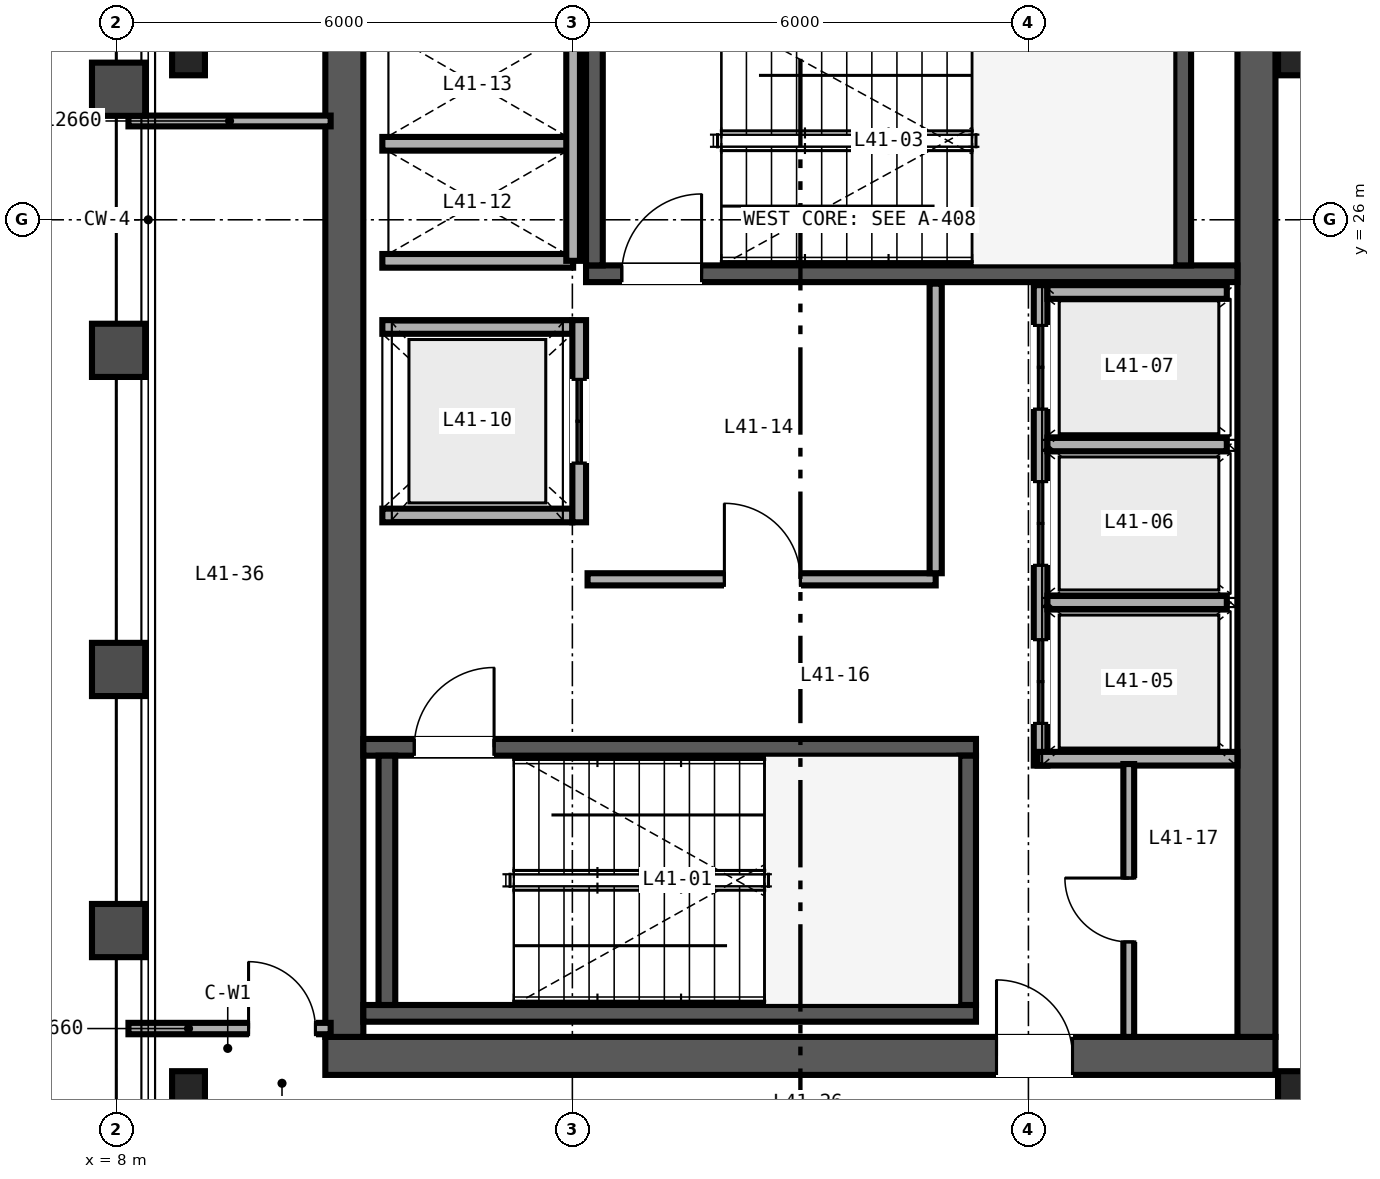
"""IFC4 building model, lengths in metres.
Left out: names, types, materials, properties, quantities, classifications, styles, units other than length and angle.
Written with IfcOpenShell. Run it as: python <this file> out.ifc"""

import sys

from ifc_helpers import new_model, si_unit, direction, frame, frame_2d, origin, origin_2d, place, context, subcontext, project, spatial, rectangle, i_section, extrude, source, transform, mapped, element, fill, save


model = new_model("IFC4")
c1 = context("Model", 3, precision=1e-05, world=origin(), true_north=direction((0.0, 1.0)))
c2 = subcontext(c1, "Body", "Model", "MODEL_VIEW")
j1 = project(units=[si_unit("LENGTHUNIT", "METRE"), si_unit("PLANEANGLEUNIT", "RADIAN")], contexts=[c1])
p1 = place(None, origin())
s1 = spatial("IfcSite", under=j1, at=p1, CompositionType="ELEMENT")
p2 = place(p1, origin())
s2 = spatial("IfcBuilding", under=s1, at=p2, CompositionType="ELEMENT")
p3 = place(p2, frame((0.0, 0.0, 166.8)))
s3 = spatial("IfcBuildingStorey", under=s2, at=p3, CompositionType="ELEMENT", Elevation=166.8)
p4 = place(p3, frame((10.75, 15.0, 0.0), z_axis=(0.0, 0.0, 1.0), x_axis=(1.0, 0.0, 0.0)))
e1 = element("IfcWall", 1, at=p4, inside=s3, PredefinedType="SHEAR", context=c2, shape_type="SweptSolid", body=[
    extrude(rectangle(XDim=12.5, YDim=0.5, at=frame_2d((6.25, 0.0))), origin(), (0.0, 0.0, 1.0), 3.37),
])
p5 = place(p4, frame((8.83, 0.0, 0.0)))
e2 = element("IfcOpeningElement", 2, at=p5, cuts=e1, PredefinedType="OPENING", context=c2, shape_type="SweptSolid", body=[
    extrude(rectangle(XDim=1.0, YDim=2.15, at=frame_2d((0.5, 1.075))), frame((0.0, 0.26, 0.0), z_axis=(0.0, -1.0, 0.0), x_axis=(1.0, 0.0, 0.0)), (0.0, 0.0, 1.0), 0.52),
])
for number, where, z_axis, x_axis in (
    (3, (11.0, 15.25, 0.0), (0.0, 0.0, 1.0), (0.0, 1.0, 0.0)),
    (4, (23.0, 15.25, 0.0), (0.0, 0.0, 1.0), (0.0, 1.0, 0.0)),
):
    element("IfcWall", number, at=place(p3, frame(where, z_axis=z_axis, x_axis=x_axis)), inside=s3, PredefinedType="SHEAR", context=c2, shape_type="SweptSolid", body=[
        extrude(rectangle(XDim=21.5, YDim=0.5, at=frame_2d((10.75, 0.0))), origin(), (0.0, 0.0, 1.0), 3.37),
    ])
p6 = place(p3, frame((11.25, 15.56, 0.0), z_axis=(0.0, 0.0, 1.0), x_axis=(1.0, 0.0, 0.0)))
e5 = element("IfcWall", 5, at=p6, inside=s3, PredefinedType="SHEAR", context=c2, shape_type="SweptSolid", body=[
    extrude(rectangle(XDim=8.06, YDim=0.22, at=frame_2d((4.03, 0.0))), origin(), (0.0, 0.0, 1.0), 3.4),
])
p7 = place(p3, frame((11.25, 19.06, 0.0), z_axis=(0.0, 0.0, 1.0), x_axis=(1.0, 0.0, 0.0)))
e6 = element("IfcWall", 6, at=p7, inside=s3, PredefinedType="SHEAR", context=c2, shape_type="SweptSolid", body=[
    extrude(rectangle(XDim=8.06, YDim=0.22, at=frame_2d((4.03, 0.0))), origin(), (0.0, 0.0, 1.0), 3.4),
])
p8 = place(p7, frame((0.67, 0.0, 0.0)))
e7 = element("IfcOpeningElement", 7, at=p8, cuts=e6, PredefinedType="OPENING", context=c2, shape_type="SweptSolid", body=[
    extrude(rectangle(XDim=1.05, YDim=2.15, at=frame_2d((0.525, 1.075))), frame((0.0, 0.12, 0.0), z_axis=(0.0, -1.0, 0.0), x_axis=(1.0, 0.0, 0.0)), (0.0, 0.0, 1.0), 0.24),
])
for number, where, z_axis, x_axis in (
    (8, (11.56, 15.67, 0.0), (0.0, 0.0, 1.0), (0.0, 1.0, 0.0)),
    (9, (19.2, 15.67, 0.0), (0.0, 0.0, 1.0), (0.0, 1.0, 0.0)),
):
    element("IfcWall", number, at=place(p3, frame(where, z_axis=z_axis, x_axis=x_axis)), inside=s3, PredefinedType="SHEAR", context=c2, shape_type="SweptSolid", body=[
        extrude(rectangle(XDim=3.28, YDim=0.22, at=frame_2d((1.64, 0.0))), origin(), (0.0, 0.0, 1.0), 3.4),
    ])
p9 = place(p3, frame((14.18, 25.29, 0.0), z_axis=(0.0, 0.0, 1.0), x_axis=(1.0, 0.0, 0.0)))
e10 = element("IfcWall", 10, at=p9, inside=s3, PredefinedType="SHEAR", context=c2, shape_type="SweptSolid", body=[
    extrude(rectangle(XDim=8.57, YDim=0.22, at=frame_2d((4.285, 0.0))), origin(), (0.0, 0.0, 1.0), 3.4),
])
p10 = place(p9, frame((0.47, 0.0, 0.0)))
e11 = element("IfcOpeningElement", 11, at=p10, cuts=e10, PredefinedType="OPENING", context=c2, shape_type="SweptSolid", body=[
    extrude(rectangle(XDim=1.05, YDim=2.15, at=frame_2d((0.525, 1.075))), frame((0.0, 0.12, 0.0), z_axis=(0.0, -1.0, 0.0), x_axis=(1.0, 0.0, 0.0)), (0.0, 0.0, 1.0), 0.24),
])
for number, where, z_axis, x_axis in (
    (12, (14.29, 25.4, 0.0), (0.0, 0.0, 1.0), (0.0, 1.0, 0.0)),
    (13, (22.03, 25.4, 0.0), (0.0, 0.0, 1.0), (0.0, 1.0, 0.0)),
):
    element("IfcWall", number, at=place(p3, frame(where, z_axis=z_axis, x_axis=x_axis)), inside=s3, PredefinedType="SHEAR", context=c2, shape_type="SweptSolid", body=[
        extrude(rectangle(XDim=3.28, YDim=0.22, at=frame_2d((1.64, 0.0))), origin(), (0.0, 0.0, 1.0), 3.4),
    ])
m1 = source(origin(), c2, "Body", "SweptSolid", [
    extrude(i_section(OverallWidth=0.432, OverallDepth=0.498, WebThickness=0.056, FlangeThickness=0.089, FilletRadius=0.025, at=origin_2d()), origin(), (0.0, 0.0, 1.0), 3.37),
])
for number, where, z_axis, x_axis in (
    (14, (8.95, 14.55, 0.0), (0.0, 0.0, 1.0), (1.0, 0.0, 0.0)),
    (15, (23.5, 14.55, 0.0), (0.0, 0.0, 1.0), (1.0, 0.0, 0.0)),
    (16, (8.95, 28.15, 0.0), (0.0, 0.0, 1.0), (1.0, 0.0, 0.0)),
    (17, (23.5, 28.15, 0.0), (0.0, 0.0, 1.0), (1.0, 0.0, 0.0)),
):
    element("IfcColumn", number, at=place(p3, frame(where, z_axis=z_axis, x_axis=x_axis)), inside=s3, PredefinedType="COLUMN", context=c2, shape_type="MappedRepresentation", body=[
        mapped(m1, transform((0.0, 0.0, 0.0), scale=1.0)),
    ])
p11 = place(p3, frame((20.16, 18.82, 0.0), z_axis=(0.0, 0.0, 1.0), x_axis=(0.0, 1.0, 0.0)))
e18 = element("IfcWall", 18, at=p11, inside=s3, PredefinedType="SOLIDWALL", context=c2, shape_type="SweptSolid", body=[
    extrude(rectangle(XDim=6.32, YDim=0.18, at=frame_2d((3.16, 0.0))), origin(), (0.0, 0.0, 1.0), 2.47),
])
p12 = place(p11, frame((0.555, 0.0, 0.0)))
e19 = element("IfcOpeningElement", 19, at=p12, cuts=e18, PredefinedType="OPENING", context=c2, shape_type="SweptSolid", body=[
    extrude(rectangle(XDim=1.1, YDim=2.2, at=frame_2d((0.55, 1.1))), frame((0.0, 0.1, 0.0), z_axis=(0.0, -1.0, 0.0), x_axis=(1.0, 0.0, 0.0)), (0.0, 0.0, 1.0), 0.2),
])
p13 = place(p11, frame((2.635, 0.0, 0.0)))
e20 = element("IfcOpeningElement", 20, at=p13, cuts=e18, PredefinedType="OPENING", context=c2, shape_type="SweptSolid", body=[
    extrude(rectangle(XDim=1.1, YDim=2.2, at=frame_2d((0.55, 1.1))), frame((0.0, 0.1, 0.0), z_axis=(0.0, -1.0, 0.0), x_axis=(1.0, 0.0, 0.0)), (0.0, 0.0, 1.0), 0.2),
])
p14 = place(p11, frame((4.69, 0.0, 0.0)))
e21 = element("IfcOpeningElement", 21, at=p14, cuts=e18, PredefinedType="OPENING", context=c2, shape_type="SweptSolid", body=[
    extrude(rectangle(XDim=1.1, YDim=2.2, at=frame_2d((0.55, 1.1))), frame((0.0, 0.1, 0.0), z_axis=(0.0, -1.0, 0.0), x_axis=(1.0, 0.0, 0.0)), (0.0, 0.0, 1.0), 0.2),
])
p15 = place(p3, frame((20.12, 18.91, 0.0), z_axis=(0.0, 0.0, 1.0), x_axis=(1.0, 0.0, 0.0)))
e22 = element("IfcWall", 22, at=p15, inside=s3, PredefinedType="SOLIDWALL", context=c2, shape_type="SweptSolid", body=[
    extrude(rectangle(XDim=2.63, YDim=0.18, at=frame_2d((1.315, 0.0))), origin(), (0.0, 0.0, 1.0), 3.37),
])
p16 = place(p3, frame((20.25, 25.05, 0.0), z_axis=(0.0, 0.0, 1.0), x_axis=(1.0, 0.0, 0.0)))
e23 = element("IfcWall", 23, at=p16, inside=s3, PredefinedType="SOLIDWALL", context=c2, shape_type="SweptSolid", body=[
    extrude(rectangle(XDim=2.36, YDim=0.18, at=frame_2d((1.18, 0.0))), origin(), (0.0, 0.0, 1.0), 3.37),
])
p17 = place(p3, frame((20.25, 20.965, 0.0), z_axis=(0.0, 0.0, 1.0), x_axis=(1.0, 0.0, 0.0)))
e24 = element("IfcWall", 24, at=p17, inside=s3, PredefinedType="SOLIDWALL", context=c2, shape_type="SweptSolid", body=[
    extrude(rectangle(XDim=2.36, YDim=0.18, at=frame_2d((1.18, 0.0))), origin(), (0.0, 0.0, 1.0), 2.47),
])
p18 = place(p3, frame((20.25, 23.045, 0.0), z_axis=(0.0, 0.0, 1.0), x_axis=(1.0, 0.0, 0.0)))
e25 = element("IfcWall", 25, at=p18, inside=s3, PredefinedType="SOLIDWALL", context=c2, shape_type="SweptSolid", body=[
    extrude(rectangle(XDim=2.36, YDim=0.18, at=frame_2d((1.18, 0.0))), origin(), (0.0, 0.0, 1.0), 3.37),
])
for number, where, z_axis, x_axis in (
    (26, (11.5, 22.11, 0.0), (0.0, 0.0, 1.0), (1.0, 0.0, 0.0)),
    (27, (11.5, 24.59, 0.0), (0.0, 0.0, 1.0), (1.0, 0.0, 0.0)),
):
    element("IfcWall", number, at=place(p3, frame(where, z_axis=z_axis, x_axis=x_axis)), inside=s3, PredefinedType="SOLIDWALL", context=c2, shape_type="SweptSolid", body=[
        extrude(rectangle(XDim=2.5, YDim=0.18, at=frame_2d((1.25, 0.0))), origin(), (0.0, 0.0, 1.0), 3.37),
    ])
p19 = place(p3, frame((14.09, 22.02, 0.0), z_axis=(0.0, 0.0, 1.0), x_axis=(0.0, 1.0, 0.0)))
e28 = element("IfcWall", 28, at=p19, inside=s3, PredefinedType="SOLIDWALL", context=c2, shape_type="SweptSolid", body=[
    extrude(rectangle(XDim=2.66, YDim=0.18, at=frame_2d((1.33, 0.0))), origin(), (0.0, 0.0, 1.0), 3.37),
])
p20 = place(p19, frame((0.78, 0.0, 0.0)))
e29 = element("IfcOpeningElement", 29, at=p20, cuts=e28, PredefinedType="OPENING", context=c2, shape_type="SweptSolid", body=[
    extrude(rectangle(XDim=1.1, YDim=2.2, at=frame_2d((0.55, 1.1))), frame((0.0, 0.1, 0.0), z_axis=(0.0, -1.0, 0.0), x_axis=(1.0, 0.0, 0.0)), (0.0, 0.0, 1.0), 0.2),
])
for number, where, z_axis, x_axis in (
    (30, (11.5, 25.46, 0.0), (0.0, 0.0, 1.0), (1.0, 0.0, 0.0)),
    (31, (11.5, 27.0, 0.0), (0.0, 0.0, 1.0), (1.0, 0.0, 0.0)),
):
    element("IfcWall", number, at=place(p3, frame(where, z_axis=z_axis, x_axis=x_axis)), inside=s3, PredefinedType="SOLIDWALL", context=c2, shape_type="SweptSolid", body=[
        extrude(rectangle(XDim=2.51, YDim=0.18, at=frame_2d((1.255, 0.0))), origin(), (0.0, 0.0, 1.0), 3.37),
    ])
p21 = place(p3, frame((14.01, 25.46, 0.0), z_axis=(0.0, 0.0, 1.0), x_axis=(0.0, 1.0, 0.0)))
e32 = element("IfcWall", 32, at=p21, inside=s3, PredefinedType="SOLIDWALL", context=c2, shape_type="SweptSolid", body=[
    extrude(rectangle(XDim=3.08, YDim=0.18, at=frame_2d((1.54, 0.0))), origin(), (0.0, 0.0, 1.0), 3.37),
])
p22 = place(p3, frame((14.2, 21.27, 0.0), z_axis=(0.0, 0.0, 1.0), x_axis=(1.0, 0.0, 0.0)))
e33 = element("IfcWall", 33, at=p22, inside=s3, PredefinedType="PARTITIONING", context=c2, shape_type="SweptSolid", body=[
    extrude(rectangle(XDim=4.58, YDim=0.16, at=frame_2d((2.29, 0.0))), origin(), (0.0, 0.0, 1.0), 3.37),
])
p23 = place(p22, frame((1.8, 0.0, 0.0)))
e34 = element("IfcOpeningElement", 34, at=p23, cuts=e33, PredefinedType="OPENING", context=c2, shape_type="SweptSolid", body=[
    extrude(rectangle(XDim=1.0, YDim=2.15, at=frame_2d((0.5, 1.075))), frame((0.0, 0.09, 0.0), z_axis=(0.0, -1.0, 0.0), x_axis=(1.0, 0.0, 0.0)), (0.0, 0.0, 1.0), 0.18),
])
p24 = place(p3, frame((18.78, 21.35, 0.0), z_axis=(0.0, 0.0, 1.0), x_axis=(0.0, 1.0, 0.0)))
e35 = element("IfcWall", 35, at=p24, inside=s3, PredefinedType="PARTITIONING", context=c2, shape_type="SweptSolid", body=[
    extrude(rectangle(XDim=3.81, YDim=0.16, at=frame_2d((1.905, 0.0))), origin(), (0.0, 0.0, 1.0), 3.37),
])
p25 = place(p3, frame((21.32, 15.25, 0.0), z_axis=(0.0, 0.0, 1.0), x_axis=(0.0, 1.0, 0.0)))
e36 = element("IfcWall", 36, at=p25, inside=s3, PredefinedType="PARTITIONING", context=c2, shape_type="SweptSolid", body=[
    extrude(rectangle(XDim=3.59, YDim=0.142, at=frame_2d((1.795, 0.0))), origin(), (0.0, 0.0, 1.0), 3.37),
])
p26 = place(p25, frame((1.25, 0.0, 0.0)))
e37 = element("IfcOpeningElement", 37, at=p26, cuts=e36, PredefinedType="OPENING", context=c2, shape_type="SweptSolid", body=[
    extrude(rectangle(XDim=0.84, YDim=2.1, at=frame_2d((0.42, 1.05))), frame((0.0, 0.081, 0.0), z_axis=(0.0, -1.0, 0.0), x_axis=(1.0, 0.0, 0.0)), (0.0, 0.0, 1.0), 0.162),
])
p27 = place(p3, frame((8.16, 15.36, 0.0), z_axis=(0.0, 0.0, 1.0), x_axis=(1.0, 0.0, 0.0)))
e38 = element("IfcWall", 38, at=p27, inside=s3, PredefinedType="PARTITIONING", context=c2, shape_type="SweptSolid", body=[
    extrude(rectangle(XDim=2.66, YDim=0.15, at=frame_2d((1.33, 0.0))), origin(), (0.0, 0.0, 1.0), 2.591),
])
p28 = place(p27, frame((1.58, 0.0, 0.0)))
e39 = element("IfcOpeningElement", 39, at=p28, cuts=e38, PredefinedType="OPENING", context=c2, shape_type="SweptSolid", body=[
    extrude(rectangle(XDim=0.88, YDim=2.15, at=frame_2d((0.44, 1.075))), frame((0.0, 0.085, 0.0), z_axis=(0.0, -1.0, 0.0), x_axis=(1.0, 0.0, 0.0)), (0.0, 0.0, 1.0), 0.17),
])
p29 = place(p3, frame((8.16, 27.3, 0.0), z_axis=(0.0, 0.0, 1.0), x_axis=(1.0, 0.0, 0.0)))
e40 = element("IfcWall", 40, at=p29, inside=s3, PredefinedType="PARTITIONING", context=c2, shape_type="SweptSolid", body=[
    extrude(rectangle(XDim=2.66, YDim=0.142, at=frame_2d((1.33, 0.0))), origin(), (0.0, 0.0, 1.0), 2.591),
])
m2 = source(origin(), c2, "Body", "SweptSolid", [
    extrude(rectangle(XDim=1.05, YDim=2.15, at=frame_2d((0.525, 1.075))), frame((0.0, 0.025, 0.0), z_axis=(0.0, -1.0, 0.0), x_axis=(1.0, 0.0, 0.0)), (0.0, 0.0, 1.0), 0.05),
])
p30 = place(p8, origin())
e41 = element("IfcDoor", 41, at=p30, inside=s3, OperationType="SINGLE_SWING_RIGHT", PredefinedType="DOOR", context=c2, shape_type="MappedRepresentation", body=[
    mapped(m2, transform((0.0, 0.0, 0.0), scale=1.0)),
])
fill(e7, e41)
p31 = place(p10, origin())
e42 = element("IfcDoor", 42, at=p31, inside=s3, OperationType="SINGLE_SWING_RIGHT", PredefinedType="DOOR", context=c2, shape_type="MappedRepresentation", body=[
    mapped(m2, transform((0.0, 0.0, 0.0), scale=1.0)),
])
fill(e11, e42)
m3 = source(origin(), c2, "Body", "SweptSolid", [
    extrude(rectangle(XDim=1.1, YDim=2.2, at=frame_2d((0.55, 1.1))), frame((0.0, 0.025, 0.0), z_axis=(0.0, -1.0, 0.0), x_axis=(1.0, 0.0, 0.0)), (0.0, 0.0, 1.0), 0.05),
])
p32 = place(p12, origin())
e43 = element("IfcDoor", 43, at=p32, inside=s3, OperationType="DOUBLE_DOOR_SLIDING", PredefinedType="DOOR", context=c2, shape_type="MappedRepresentation", body=[
    mapped(m3, transform((0.0, 0.0, 0.0), scale=1.0)),
])
fill(e19, e43)
p33 = place(p13, origin())
e44 = element("IfcDoor", 44, at=p33, inside=s3, OperationType="DOUBLE_DOOR_SLIDING", PredefinedType="DOOR", context=c2, shape_type="MappedRepresentation", body=[
    mapped(m3, transform((0.0, 0.0, 0.0), scale=1.0)),
])
fill(e20, e44)
p34 = place(p14, origin())
e45 = element("IfcDoor", 45, at=p34, inside=s3, OperationType="DOUBLE_DOOR_SLIDING", PredefinedType="DOOR", context=c2, shape_type="MappedRepresentation", body=[
    mapped(m3, transform((0.0, 0.0, 0.0), scale=1.0)),
])
fill(e21, e45)
p35 = place(p20, origin())
e46 = element("IfcDoor", 46, at=p35, inside=s3, OperationType="DOUBLE_DOOR_SLIDING", PredefinedType="DOOR", context=c2, shape_type="MappedRepresentation", body=[
    mapped(m3, transform((0.0, 0.0, 0.0), scale=1.0)),
])
fill(e29, e46)
m4 = source(origin(), c2, "Body", "SweptSolid", [
    extrude(rectangle(XDim=1.0, YDim=2.15, at=frame_2d((0.5, 1.075))), frame((0.0, 0.025, 0.0), z_axis=(0.0, -1.0, 0.0), x_axis=(1.0, 0.0, 0.0)), (0.0, 0.0, 1.0), 0.05),
])
p36 = place(p23, origin())
e47 = element("IfcDoor", 47, at=p36, inside=s3, OperationType="SINGLE_SWING_LEFT", PredefinedType="DOOR", context=c2, shape_type="MappedRepresentation", body=[
    mapped(m4, transform((0.0, 0.0, 0.0), scale=1.0)),
])
fill(e34, e47)
m5 = source(origin(), c2, "Body", "SweptSolid", [
    extrude(rectangle(XDim=0.84, YDim=2.1, at=frame_2d((0.42, 1.05))), frame((0.0, 0.025, 0.0), z_axis=(0.0, -1.0, 0.0), x_axis=(1.0, 0.0, 0.0)), (0.0, 0.0, 1.0), 0.05),
])
p37 = place(p26, origin())
e48 = element("IfcDoor", 48, at=p37, inside=s3, OperationType="SINGLE_SWING_RIGHT", PredefinedType="DOOR", context=c2, shape_type="MappedRepresentation", body=[
    mapped(m5, transform((0.0, 0.0, 0.0), scale=1.0)),
])
fill(e37, e48)
p38 = place(p5, origin())
e49 = element("IfcDoor", 49, at=p38, inside=s3, OperationType="SINGLE_SWING_LEFT", PredefinedType="DOOR", context=c2, shape_type="MappedRepresentation", body=[
    mapped(m4, transform((0.0, 0.0, 0.0), scale=1.0)),
])
fill(e2, e49)
m6 = source(origin(), c2, "Body", "SweptSolid", [
    extrude(rectangle(XDim=0.88, YDim=2.15, at=frame_2d((0.44, 1.075))), frame((0.0, 0.025, 0.0), z_axis=(0.0, -1.0, 0.0), x_axis=(1.0, 0.0, 0.0)), (0.0, 0.0, 1.0), 0.05),
])
p39 = place(p28, origin())
e50 = element("IfcDoor", 50, at=p39, inside=s3, OperationType="SINGLE_SWING_LEFT", PredefinedType="DOOR", context=c2, shape_type="MappedRepresentation", body=[
    mapped(m6, transform((0.0, 0.0, 0.0), scale=1.0)),
])
fill(e39, e50)
save(model, sys.argv[1])
